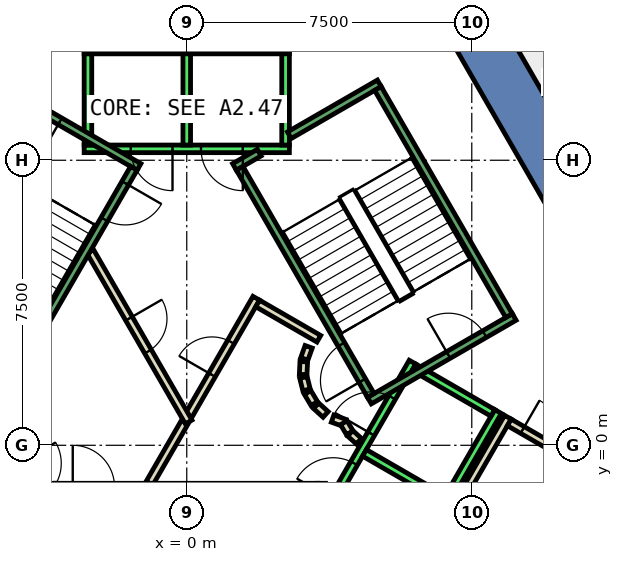
"""IFC4 building model, lengths in metres.
Left out: names, types, materials, properties, quantities, classifications, styles, units other than length and angle.
Written with IfcOpenShell. Run it as: python <this file> out.ifc"""

import sys

from ifc_helpers import new_model, si_unit, direction, frame, frame_2d, origin, place, context, subcontext, project, spatial, polyline, rectangle, outline, extrude, element, fill, save


model = new_model("IFC4")
c1 = context("Model", 3, precision=1e-05, world=origin(), true_north=direction((0.0, 1.0)))
c2 = subcontext(c1, "Body", "Model", "MODEL_VIEW")
j1 = project(units=[si_unit("LENGTHUNIT", "METRE"), si_unit("PLANEANGLEUNIT", "RADIAN")], contexts=[c1])
p1 = place(None, origin())
s1 = spatial("IfcSite", under=j1, at=p1, CompositionType="ELEMENT")
p2 = place(p1, origin())
s2 = spatial("IfcBuilding", under=s1, at=p2, CompositionType="ELEMENT")
p3 = place(p2, frame((0.0, 0.0, 227.6)))
s3 = spatial("IfcBuildingStorey", under=s2, at=p3, CompositionType="ELEMENT", Elevation=227.6)
p4 = place(p3, frame((0.0, 0.0, -0.4)))
e1 = element("IfcWall", 1, at=p4, inside=s3, PredefinedType="SHEAR", context=c2, shape_type="SweptSolid", body=[
    extrude(outline(polyline([(8.084, 11.498), (6.871, 10.798), (11.662, 2.5), (13.279, 2.5), (8.084, 11.498)])), origin(), (0.0, 0.0, 1.0), 4.2),
])
p5 = place(p3, frame((0.0, 0.0, -0.4)))
e2 = element("IfcWall", 2, at=p5, inside=s3, PredefinedType="SHEAR", context=c2, shape_type="SweptSolid", body=[
    extrude(outline(polyline([(6.64, -9.0), (13.279, 2.5), (11.662, 2.5), (5.831, -7.6), (6.64, -9.0)])), origin(), (0.0, 0.0, 1.0), 4.2),
])
p6 = place(p3, frame((5.751, -3.938, 0.0), z_axis=(0.0, 0.0, 1.0), x_axis=(0.500034260056, 0.866005622828, 0.0)))
e3 = element("IfcWall", 3, at=p6, inside=s3, PredefinedType="PARTITIONING", context=c2, shape_type="SweptSolid", body=[
    extrude(rectangle(XDim=5.399, YDim=0.2, at=frame_2d((2.7, 0.0))), origin(), (0.0, 0.0, 1.0), 3.8),
])
p7 = place(p3, frame((8.488, 0.602, 0.0), z_axis=(0.0, 0.0, 1.0), x_axis=(0.86585331735, -0.500297944063, 0.0)))
e4 = element("IfcWall", 4, at=p7, inside=s3, PredefinedType="PARTITIONING", context=c2, shape_type="SweptSolid", body=[
    extrude(rectangle(XDim=1.799, YDim=0.2, at=frame_2d((0.9, 0.0))), origin(), (0.0, 0.0, 1.0), 3.8),
])
p8 = place(p7, frame((0.4, 0.0, 0.0)))
e5 = element("IfcOpeningElement", 5, at=p8, cuts=e4, PredefinedType="OPENING", context=c2, shape_type="SweptSolid", body=[
    extrude(rectangle(XDim=0.9, YDim=2.1, at=frame_2d((0.45, 1.05))), frame((0.0, 0.11, 0.0), z_axis=(0.0, -1.0, 0.0), x_axis=(1.0, 0.0, 0.0)), (0.0, 0.0, 1.0), 0.22),
])
p9 = place(p3, frame((-0.982, -1.0, 0.0), z_axis=(0.0, 0.0, 1.0), x_axis=(0.50024047865, 0.865886518847, 0.0)))
e6 = element("IfcWall", 6, at=p9, inside=s3, PredefinedType="PARTITIONING", context=c2, shape_type="SweptSolid", body=[
    extrude(rectangle(XDim=1.863, YDim=0.2, at=frame_2d((0.931, 0.0))), origin(), (0.0, 0.0, 1.0), 3.8),
])
p10 = place(p3, frame((0.05, 0.787, 0.0), z_axis=(0.0, 0.0, 1.0), x_axis=(0.499954076797, 0.866051915934, 0.0)))
e7 = element("IfcWall", 7, at=p10, inside=s3, PredefinedType="PARTITIONING", context=c2, shape_type="SweptSolid", body=[
    extrude(rectangle(XDim=3.558, YDim=0.2, at=frame_2d((1.779, 0.0))), origin(), (0.0, 0.0, 1.0), 3.8),
])
p11 = place(p10, frame((1.229, 0.0, 0.0)))
e8 = element("IfcOpeningElement", 8, at=p11, cuts=e7, PredefinedType="OPENING", context=c2, shape_type="SweptSolid", body=[
    extrude(rectangle(XDim=1.0, YDim=2.1, at=frame_2d((0.5, 1.05))), frame((0.0, 0.11, 0.0), z_axis=(0.0, -1.0, 0.0), x_axis=(1.0, 0.0, 0.0)), (0.0, 0.0, 1.0), 0.22),
])
p12 = place(p3, frame((1.866, 3.732, 0.0), z_axis=(0.0, 0.0, 1.0), x_axis=(0.866043361281, -0.499968895414, 0.0)))
e9 = element("IfcWall", 9, at=p12, inside=s3, PredefinedType="PARTITIONING", context=c2, shape_type="SweptSolid", body=[
    extrude(rectangle(XDim=1.858, YDim=0.2, at=frame_2d((0.929, 0.0))), origin(), (0.0, 0.0, 1.0), 3.8),
])
p13 = place(p3, frame((3.208, 2.592, 0.0), z_axis=(0.0, 0.0, 1.0), x_axis=(-0.337388820924, -0.941365382578, 0.0)))
e10 = element("IfcWall", 10, at=p13, inside=s3, PredefinedType="PARTITIONING", context=c2, shape_type="SweptSolid", body=[
    extrude(rectangle(XDim=0.338, YDim=0.2, at=frame_2d((0.169, 0.0))), origin(), (0.0, 0.0, 1.0), 3.8),
])
p14 = place(p3, frame((3.079, 2.199, 0.0), z_axis=(0.0, 0.0, 1.0), x_axis=(-0.047771483479, -0.998858290933, 0.0)))
e11 = element("IfcWall", 11, at=p14, inside=s3, PredefinedType="PARTITIONING", context=c2, shape_type="SweptSolid", body=[
    extrude(rectangle(XDim=0.337, YDim=0.2, at=frame_2d((0.169, 0.0))), origin(), (0.0, 0.0, 1.0), 3.8),
])
p15 = place(p3, frame((3.07, 1.786, 0.0), z_axis=(0.0, 0.0, 1.0), x_axis=(0.242705583207, -0.970099994784, 0.0)))
e12 = element("IfcWall", 12, at=p15, inside=s3, PredefinedType="PARTITIONING", context=c2, shape_type="SweptSolid", body=[
    extrude(rectangle(XDim=0.338, YDim=0.2, at=frame_2d((0.169, 0.0))), origin(), (0.0, 0.0, 1.0), 3.8),
])
for number, where, z_axis, x_axis in (
    (13, (3.182, 1.388, 0.0), (0.0, 0.0, 1.0), (0.512, -0.859, 0.0)),
    (14, (3.404, 1.039, 0.0), (0.0, 0.0, 1.0), (0.74, -0.672, 0.0)),
):
    element("IfcWall", number, at=place(p3, frame(where, z_axis=z_axis, x_axis=x_axis)), inside=s3, PredefinedType="PARTITIONING", context=c2, shape_type="SweptSolid", body=[
        extrude(rectangle(XDim=0.338, YDim=0.2, at=frame_2d((0.169, 0.0))), origin(), (0.0, 0.0, 1.0), 3.8),
    ])
p16 = place(p3, frame((3.838, 0.702, 0.0), z_axis=(0.0, 0.0, 1.0), x_axis=(0.941035081519, -0.338308993895, 0.0)))
e15 = element("IfcWall", 15, at=p16, inside=s3, PredefinedType="PARTITIONING", context=c2, shape_type="SweptSolid", body=[
    extrude(rectangle(XDim=0.337, YDim=0.2, at=frame_2d((0.168, 0.0))), origin(), (0.0, 0.0, 1.0), 3.8),
])
p17 = place(p3, frame((4.132, 0.593, 0.0), z_axis=(0.0, 0.0, 1.0), x_axis=(0.513561617048, -0.858052717201, 0.0)))
e16 = element("IfcWall", 16, at=p17, inside=s3, PredefinedType="PARTITIONING", context=c2, shape_type="SweptSolid", body=[
    extrude(rectangle(XDim=0.308, YDim=0.2, at=frame_2d((0.154, 0.0))), origin(), (0.0, 0.0, 1.0), 3.8),
])
p18 = place(p3, frame((4.301, 0.315, 0.0), z_axis=(0.0, 0.0, 1.0), x_axis=(0.741798017506, -0.670623367639, 0.0)))
e17 = element("IfcWall", 17, at=p18, inside=s3, PredefinedType="PARTITIONING", context=c2, shape_type="SweptSolid", body=[
    extrude(rectangle(XDim=0.309, YDim=0.2, at=frame_2d((0.154, 0.0))), origin(), (0.0, 0.0, 1.0), 3.8),
])
p19 = place(p3, frame((-2.54, 5.1, 0.0), z_axis=(0.0, 0.0, 1.0), x_axis=(0.499925051871, -0.866068670783, 0.0)))
e18 = element("IfcWall", 18, at=p19, inside=s3, PredefinedType="PARTITIONING", context=c2, shape_type="SweptSolid", body=[
    extrude(rectangle(XDim=5.181, YDim=0.2, at=frame_2d((2.59, 0.0))), origin(), (0.0, 0.0, 1.0), 3.8),
])
p20 = place(p19, frame((2.04, 0.0, 0.0)))
e19 = element("IfcOpeningElement", 19, at=p20, cuts=e18, PredefinedType="OPENING", context=c2, shape_type="SweptSolid", body=[
    extrude(rectangle(XDim=1.0, YDim=2.1, at=frame_2d((0.5, 1.05))), frame((0.0, 0.11, 0.0), z_axis=(0.0, -1.0, 0.0), x_axis=(1.0, 0.0, 0.0)), (0.0, 0.0, 1.0), 0.22),
])
p21 = place(p3, frame((2.7, 7.8, 0.0), z_axis=(0.0, 0.0, 1.0), x_axis=(-1.0, 0.0, 0.0)))
e20 = element("IfcWall", 20, at=p21, inside=s3, PredefinedType="STANDARD", context=c2, shape_type="SweptSolid", body=[
    extrude(rectangle(XDim=5.4, YDim=0.2, at=frame_2d((2.7, 0.0))), origin(), (0.0, 0.0, 1.0), 3.8),
])
p22 = place(p21, frame((1.225, 0.0, 0.0)))
e21 = element("IfcOpeningElement", 21, at=p22, cuts=e20, PredefinedType="OPENING", context=c2, shape_type="SweptSolid", body=[
    extrude(rectangle(XDim=1.1, YDim=2.1, at=frame_2d((0.55, 1.05))), frame((0.0, 0.11, 0.0), z_axis=(0.0, -1.0, 0.0), x_axis=(1.0, 0.0, 0.0)), (0.0, 0.0, 1.0), 0.22),
])
p23 = place(p21, frame((3.075, 0.0, 0.0)))
e22 = element("IfcOpeningElement", 22, at=p23, cuts=e20, PredefinedType="OPENING", context=c2, shape_type="SweptSolid", body=[
    extrude(rectangle(XDim=1.1, YDim=2.1, at=frame_2d((0.55, 1.05))), frame((0.0, 0.11, 0.0), z_axis=(0.0, -1.0, 0.0), x_axis=(1.0, 0.0, 0.0)), (0.0, 0.0, 1.0), 0.22),
])
p24 = place(p3, frame((2.7, 10.4, 0.0), z_axis=(0.0, 0.0, 1.0), x_axis=(-1.0, 0.0, 0.0)))
e23 = element("IfcWall", 23, at=p24, inside=s3, PredefinedType="STANDARD", context=c2, shape_type="SweptSolid", body=[
    extrude(rectangle(XDim=5.4, YDim=0.2, at=frame_2d((2.7, 0.0))), origin(), (0.0, 0.0, 1.0), 3.8),
])
for number, where, z_axis, x_axis in (
    (24, (2.6, 7.9, 0.0), (0.0, 0.0, 1.0), (0.0, 1.0, 0.0)),
    (25, (0.0, 7.9, 0.0), (0.0, 0.0, 1.0), (0.0, 1.0, 0.0)),
    (26, (-2.6, 7.9, 0.0), (0.0, 0.0, 1.0), (0.0, 1.0, 0.0)),
):
    element("IfcWall", number, at=place(p3, frame(where, z_axis=z_axis, x_axis=x_axis)), inside=s3, PredefinedType="STANDARD", context=c2, shape_type="SweptSolid", body=[
        extrude(rectangle(XDim=2.4, YDim=0.2, at=frame_2d((1.2, 0.0))), origin(), (0.0, 0.0, 1.0), 3.8),
    ])
p25 = place(p3, frame((-5.94, 2.188, 0.0), z_axis=(0.0, 0.0, 1.0), x_axis=(0.500034260056, -0.866005622828, 0.0)))
e27 = element("IfcWall", 27, at=p25, inside=s3, PredefinedType="STANDARD", context=c2, shape_type="SweptSolid", body=[
    extrude(rectangle(XDim=5.399, YDim=0.2, at=frame_2d((2.7, 0.0))), origin(), (0.0, 0.0, 1.0), 3.8),
])
p26 = place(p25, frame((3.075, 0.0, 0.0)))
e28 = element("IfcOpeningElement", 28, at=p26, cuts=e27, PredefinedType="OPENING", context=c2, shape_type="SweptSolid", body=[
    extrude(rectangle(XDim=1.1, YDim=2.1, at=frame_2d((0.55, 1.05))), frame((0.0, 0.11, 0.0), z_axis=(0.0, -1.0, 0.0), x_axis=(1.0, 0.0, 0.0)), (0.0, 0.0, 1.0), 0.22),
])
p27 = place(p25, frame((1.225, 0.0, 0.0)))
e29 = element("IfcOpeningElement", 29, at=p27, cuts=e27, PredefinedType="OPENING", context=c2, shape_type="SweptSolid", body=[
    extrude(rectangle(XDim=1.1, YDim=2.1, at=frame_2d((0.55, 1.05))), frame((0.0, 0.11, 0.0), z_axis=(0.0, -1.0, 0.0), x_axis=(1.0, 0.0, 0.0)), (0.0, 0.0, 1.0), 0.22),
])
p28 = place(p3, frame((3.24, -2.488, 0.0), z_axis=(0.0, 0.0, 1.0), x_axis=(0.500034260056, 0.866005622828, 0.0)))
e30 = element("IfcWall", 30, at=p28, inside=s3, PredefinedType="STANDARD", context=c2, shape_type="SweptSolid", body=[
    extrude(rectangle(XDim=5.399, YDim=0.2, at=frame_2d((2.7, 0.0))), origin(), (0.0, 0.0, 1.0), 3.8),
])
p29 = place(p28, frame((3.225, 0.0, 0.0)))
e31 = element("IfcOpeningElement", 31, at=p29, cuts=e30, PredefinedType="OPENING", context=c2, shape_type="SweptSolid", body=[
    extrude(rectangle(XDim=1.1, YDim=2.1, at=frame_2d((0.55, 1.05))), frame((0.0, 0.11, 0.0), z_axis=(0.0, -1.0, 0.0), x_axis=(1.0, 0.0, 0.0)), (0.0, 0.0, 1.0), 0.22),
])
p30 = place(p28, frame((1.225, 0.0, 0.0)))
e32 = element("IfcOpeningElement", 32, at=p30, cuts=e30, PredefinedType="OPENING", context=c2, shape_type="SweptSolid", body=[
    extrude(rectangle(XDim=1.1, YDim=2.1, at=frame_2d((0.55, 1.05))), frame((0.0, 0.11, 0.0), z_axis=(0.0, -1.0, 0.0), x_axis=(1.0, 0.0, 0.0)), (0.0, 0.0, 1.0), 0.22),
])
p31 = place(p3, frame((5.492, -3.788, 0.0), z_axis=(0.0, 0.0, 1.0), x_axis=(0.500034260056, 0.866005622828, 0.0)))
e33 = element("IfcWall", 33, at=p31, inside=s3, PredefinedType="STANDARD", context=c2, shape_type="SweptSolid", body=[
    extrude(rectangle(XDim=5.399, YDim=0.2, at=frame_2d((2.7, 0.0))), origin(), (0.0, 0.0, 1.0), 3.8),
])
for number, where, z_axis, x_axis in (
    (34, (4.677, -0.2, 0.0), (0.0, 0.0, 1.0), (0.866, -0.5, 0.0)),
    (35, (5.977, 2.052, 0.0), (0.0, 0.0, 1.0), (0.866, -0.5, 0.0)),
):
    element("IfcWall", number, at=place(p3, frame(where, z_axis=z_axis, x_axis=x_axis)), inside=s3, PredefinedType="STANDARD", context=c2, shape_type="SweptSolid", body=[
        extrude(rectangle(XDim=2.399, YDim=0.2, at=frame_2d((1.2, 0.0))), origin(), (0.0, 0.0, 1.0), 3.8),
    ])
p32 = place(p3, frame((4.806, 1.176, 0.0), z_axis=(0.0, 0.0, 1.0), x_axis=(0.866059941101, 0.499940174841, 0.0)))
e36 = element("IfcWall", 36, at=p32, inside=s3, PredefinedType="STANDARD", context=c2, shape_type="SweptSolid", body=[
    extrude(rectangle(XDim=4.4, YDim=0.2, at=frame_2d((2.2, 0.0))), origin(), (0.0, 0.0, 1.0), 3.8),
])
p33 = place(p32, frame((2.4, 0.0, 0.0)))
e37 = element("IfcOpeningElement", 37, at=p33, cuts=e36, PredefinedType="OPENING", context=c2, shape_type="SweptSolid", body=[
    extrude(rectangle(XDim=1.1, YDim=2.2, at=frame_2d((0.55, 1.1))), frame((0.0, 0.11, 0.0), z_axis=(0.0, -1.0, 0.0), x_axis=(1.0, 0.0, 0.0)), (0.0, 0.0, 1.0), 0.22),
])
p34 = place(p3, frame((2.7, 8.158, 0.0), z_axis=(0.0, 0.0, 1.0), x_axis=(0.86611865017, 0.499838457731, 0.0)))
e38 = element("IfcWall", 38, at=p34, inside=s3, PredefinedType="STANDARD", context=c2, shape_type="SweptSolid", body=[
    extrude(rectangle(XDim=2.733, YDim=0.2, at=frame_2d((1.366, 0.0))), origin(), (0.0, 0.0, 1.0), 3.8),
])
p35 = place(p3, frame((1.256, 7.324, 0.0), z_axis=(0.0, 0.0, 1.0), x_axis=(0.865915093549, 0.500191014278, 0.0)))
e39 = element("IfcWall", 39, at=p35, inside=s3, PredefinedType="STANDARD", context=c2, shape_type="SweptSolid", body=[
    extrude(rectangle(XDim=0.752, YDim=0.2, at=frame_2d((0.376, 0.0))), origin(), (0.0, 0.0, 1.0), 3.8),
])
p36 = place(p3, frame((4.843, 1.312, 0.0), z_axis=(0.0, 0.0, 1.0), x_axis=(-0.499963383562, 0.866046543262, 0.0)))
e40 = element("IfcWall", 40, at=p36, inside=s3, PredefinedType="STANDARD", context=c2, shape_type="SweptSolid", body=[
    extrude(rectangle(XDim=6.9, YDim=0.2, at=frame_2d((3.45, 0.0))), origin(), (0.0, 0.0, 1.0), 3.8),
])
p37 = place(p36, frame((0.45, 0.0, 0.0)))
e41 = element("IfcOpeningElement", 41, at=p37, cuts=e40, PredefinedType="OPENING", context=c2, shape_type="SweptSolid", body=[
    extrude(rectangle(XDim=1.1, YDim=2.2, at=frame_2d((0.55, 1.1))), frame((0.0, 0.11, 0.0), z_axis=(0.0, -1.0, 0.0), x_axis=(1.0, 0.0, 0.0)), (0.0, 0.0, 1.0), 0.22),
])
p38 = place(p3, frame((8.48, 3.412, 0.0), z_axis=(0.0, 0.0, 1.0), x_axis=(-0.499978703459, 0.866037698999, 0.0)))
e42 = element("IfcWall", 42, at=p38, inside=s3, PredefinedType="STANDARD", context=c2, shape_type="SweptSolid", body=[
    extrude(rectangle(XDim=6.9, YDim=0.2, at=frame_2d((3.45, 0.0))), origin(), (0.0, 0.0, 1.0), 3.8),
])
p39 = place(p3, frame((-1.256, 7.324, 0.0), z_axis=(0.0, 0.0, 1.0), x_axis=(-0.866046073146, 0.499964197906, 0.0)))
e43 = element("IfcWall", 43, at=p39, inside=s3, PredefinedType="STANDARD", context=c2, shape_type="SweptSolid", body=[
    extrude(rectangle(XDim=4.4, YDim=0.2, at=frame_2d((2.2, 0.0))), origin(), (0.0, 0.0, 1.0), 3.8),
])
p40 = place(p39, frame((2.4, 0.0, 0.0)))
e44 = element("IfcOpeningElement", 44, at=p40, cuts=e43, PredefinedType="OPENING", context=c2, shape_type="SweptSolid", body=[
    extrude(rectangle(XDim=1.1, YDim=2.2, at=frame_2d((0.55, 1.1))), frame((0.0, 0.11, 0.0), z_axis=(0.0, -1.0, 0.0), x_axis=(1.0, 0.0, 0.0)), (0.0, 0.0, 1.0), 0.22),
])
p41 = place(p3, frame((-1.393, 7.288, 0.0), z_axis=(0.0, 0.0, 1.0), x_axis=(-0.499963383562, -0.866046543262, 0.0)))
e45 = element("IfcWall", 45, at=p41, inside=s3, PredefinedType="STANDARD", context=c2, shape_type="SweptSolid", body=[
    extrude(rectangle(XDim=6.9, YDim=0.2, at=frame_2d((3.45, 0.0))), origin(), (0.0, 0.0, 1.0), 3.8),
])
p42 = place(p41, frame((0.45, 0.0, 0.0)))
e46 = element("IfcOpeningElement", 46, at=p42, cuts=e45, PredefinedType="OPENING", context=c2, shape_type="SweptSolid", body=[
    extrude(rectangle(XDim=1.1, YDim=2.2, at=frame_2d((0.55, 1.1))), frame((0.0, 0.11, 0.0), z_axis=(0.0, -1.0, 0.0), x_axis=(1.0, 0.0, 0.0)), (0.0, 0.0, 1.0), 0.22),
])
p43 = place(p11, origin())
e47 = element("IfcDoor", 47, at=p43, inside=s3, OperationType="SINGLE_SWING_RIGHT", PredefinedType="DOOR", context=c2, shape_type="SweptSolid", body=[
    extrude(rectangle(XDim=1.0, YDim=2.1, at=frame_2d((0.5, 1.05))), frame((0.0, 0.025, 0.0), z_axis=(0.0, -1.0, 0.0), x_axis=(1.0, 0.0, 0.0)), (0.0, 0.0, 1.0), 0.05),
])
fill(e8, e47)
p44 = place(p20, origin())
e48 = element("IfcDoor", 48, at=p44, inside=s3, OperationType="SINGLE_SWING_RIGHT", PredefinedType="DOOR", context=c2, shape_type="SweptSolid", body=[
    extrude(rectangle(XDim=1.0, YDim=2.1, at=frame_2d((0.5, 1.05))), frame((0.0, 0.025, 0.0), z_axis=(0.0, -1.0, 0.0), x_axis=(1.0, 0.0, 0.0)), (0.0, 0.0, 1.0), 0.05),
])
fill(e19, e48)
p45 = place(p8, origin())
e49 = element("IfcDoor", 49, at=p45, inside=s3, OperationType="SINGLE_SWING_RIGHT", PredefinedType="DOOR", context=c2, shape_type="SweptSolid", body=[
    extrude(rectangle(XDim=0.9, YDim=2.1, at=frame_2d((0.45, 1.05))), frame((0.0, 0.025, 0.0), z_axis=(0.0, -1.0, 0.0), x_axis=(1.0, 0.0, 0.0)), (0.0, 0.0, 1.0), 0.05),
])
fill(e5, e49)
p46 = place(p22, origin())
e50 = element("IfcDoor", 50, at=p46, inside=s3, OperationType="SLIDING_TO_LEFT", PredefinedType="DOOR", context=c2, shape_type="SweptSolid", body=[
    extrude(rectangle(XDim=1.1, YDim=2.1, at=frame_2d((0.55, 1.05))), frame((0.0, 0.025, 0.0), z_axis=(0.0, -1.0, 0.0), x_axis=(1.0, 0.0, 0.0)), (0.0, 0.0, 1.0), 0.05),
])
fill(e21, e50)
p47 = place(p23, origin())
e51 = element("IfcDoor", 51, at=p47, inside=s3, OperationType="SLIDING_TO_LEFT", PredefinedType="DOOR", context=c2, shape_type="SweptSolid", body=[
    extrude(rectangle(XDim=1.1, YDim=2.1, at=frame_2d((0.55, 1.05))), frame((0.0, 0.025, 0.0), z_axis=(0.0, -1.0, 0.0), x_axis=(1.0, 0.0, 0.0)), (0.0, 0.0, 1.0), 0.05),
])
fill(e22, e51)
p48 = place(p29, origin())
e52 = element("IfcDoor", 52, at=p48, inside=s3, OperationType="SLIDING_TO_LEFT", PredefinedType="DOOR", context=c2, shape_type="SweptSolid", body=[
    extrude(rectangle(XDim=1.1, YDim=2.1, at=frame_2d((0.55, 1.05))), frame((0.0, 0.025, 0.0), z_axis=(0.0, -1.0, 0.0), x_axis=(1.0, 0.0, 0.0)), (0.0, 0.0, 1.0), 0.05),
])
fill(e31, e52)
p49 = place(p30, origin())
e53 = element("IfcDoor", 53, at=p49, inside=s3, OperationType="SLIDING_TO_LEFT", PredefinedType="DOOR", context=c2, shape_type="SweptSolid", body=[
    extrude(rectangle(XDim=1.1, YDim=2.1, at=frame_2d((0.55, 1.05))), frame((0.0, 0.025, 0.0), z_axis=(0.0, -1.0, 0.0), x_axis=(1.0, 0.0, 0.0)), (0.0, 0.0, 1.0), 0.05),
])
fill(e32, e53)
p50 = place(p37, origin())
e54 = element("IfcDoor", 54, at=p50, inside=s3, OperationType="SINGLE_SWING_LEFT", PredefinedType="DOOR", context=c2, shape_type="SweptSolid", body=[
    extrude(rectangle(XDim=1.1, YDim=2.2, at=frame_2d((0.55, 1.1))), frame((0.0, 0.025, 0.0), z_axis=(0.0, -1.0, 0.0), x_axis=(1.0, 0.0, 0.0)), (0.0, 0.0, 1.0), 0.05),
])
fill(e41, e54)
p51 = place(p33, origin())
e55 = element("IfcDoor", 55, at=p51, inside=s3, OperationType="SINGLE_SWING_LEFT", PredefinedType="DOOR", context=c2, shape_type="SweptSolid", body=[
    extrude(rectangle(XDim=1.1, YDim=2.2, at=frame_2d((0.55, 1.1))), frame((0.0, 0.025, 0.0), z_axis=(0.0, -1.0, 0.0), x_axis=(1.0, 0.0, 0.0)), (0.0, 0.0, 1.0), 0.05),
])
fill(e37, e55)
p52 = place(p42, origin())
e56 = element("IfcDoor", 56, at=p52, inside=s3, OperationType="SINGLE_SWING_LEFT", PredefinedType="DOOR", context=c2, shape_type="SweptSolid", body=[
    extrude(rectangle(XDim=1.1, YDim=2.2, at=frame_2d((0.55, 1.1))), frame((0.0, 0.025, 0.0), z_axis=(0.0, -1.0, 0.0), x_axis=(1.0, 0.0, 0.0)), (0.0, 0.0, 1.0), 0.05),
])
fill(e46, e56)
p53 = place(p40, origin())
e57 = element("IfcDoor", 57, at=p53, inside=s3, OperationType="SINGLE_SWING_LEFT", PredefinedType="DOOR", context=c2, shape_type="SweptSolid", body=[
    extrude(rectangle(XDim=1.1, YDim=2.2, at=frame_2d((0.55, 1.1))), frame((0.0, 0.025, 0.0), z_axis=(0.0, -1.0, 0.0), x_axis=(1.0, 0.0, 0.0)), (0.0, 0.0, 1.0), 0.05),
])
fill(e44, e57)
save(model, sys.argv[1])
